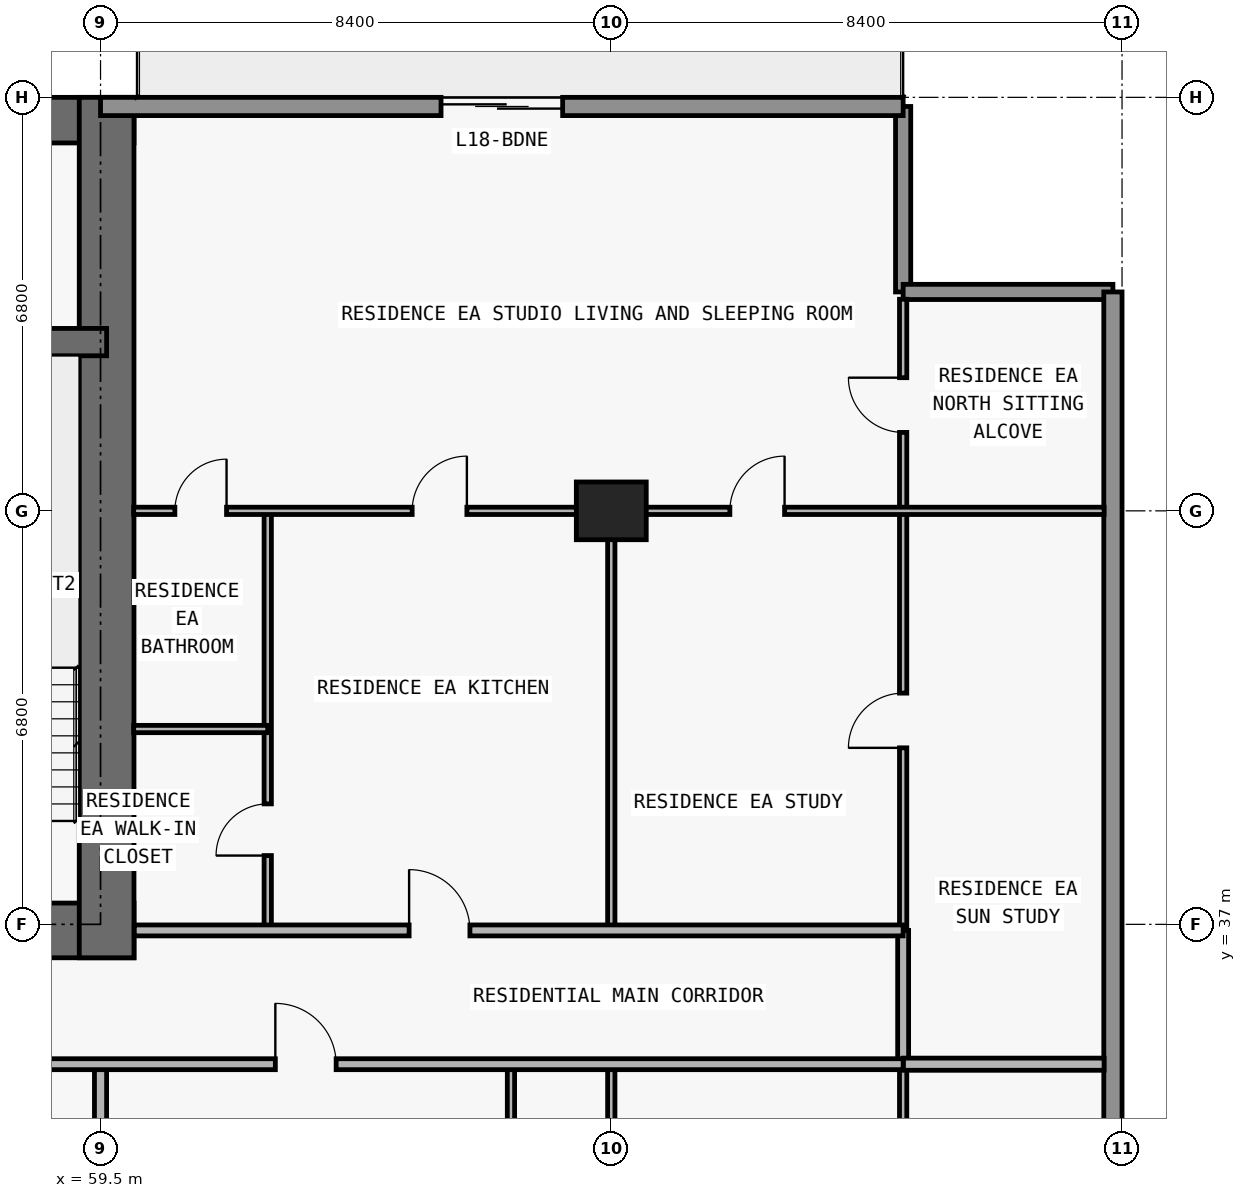
"""IFC4 building model, lengths in metres.
Left out: names, types, materials, properties, quantities, classifications, styles, units other than length and angle.
Written with IfcOpenShell. Run it as: python <this file> out.ifc"""

import sys

from ifc_helpers import new_model, si_unit, direction, frame, frame_2d, origin, origin_2d, place, context, subcontext, project, spatial, rectangle, extrude, element, fill, save


model = new_model("IFC4")
c1 = context("Model", 3, precision=1e-05, world=origin(), true_north=direction((0.0, 1.0)))
c2 = subcontext(c1, "Body", "Model", "MODEL_VIEW")
j1 = project(units=[si_unit("LENGTHUNIT", "METRE"), si_unit("PLANEANGLEUNIT", "RADIAN")], contexts=[c1])
p1 = place(None, origin())
s1 = spatial("IfcSite", under=j1, at=p1, CompositionType="ELEMENT")
p2 = place(p1, origin())
s2 = spatial("IfcBuilding", under=s1, at=p2, CompositionType="ELEMENT")
p3 = place(p2, frame((0.0, 0.0, 69.6)))
s3 = spatial("IfcBuildingStorey", under=s2, at=p3, CompositionType="ELEMENT", Elevation=69.6)
p4 = place(p3, frame((67.9, 43.8, 0.0), z_axis=(0.0, 0.0, 1.0), x_axis=(1.0, 0.0, 0.0)))
e1 = element("IfcColumn", 1, at=p4, inside=s3, PredefinedType="COLUMN", context=c2, shape_type="SweptSolid", body=[
    extrude(rectangle(XDim=1.15, YDim=0.95, at=origin_2d()), origin(), (0.0, 0.0, 1.0), 3.05),
])
p5 = place(p3, frame((17.75, 36.9, 0.0), z_axis=(0.0, 0.0, 1.0), x_axis=(1.0, 0.0, 0.0)))
e2 = element("IfcWall", 2, at=p5, inside=s3, PredefinedType="SHEAR", context=c2, shape_type="SweptSolid", body=[
    extrude(rectangle(XDim=42.3, YDim=0.9, at=frame_2d((21.15, 0.0))), origin(), (0.0, 0.0, 1.0), 3.05),
])
p6 = place(p5, frame((14.55, 0.0, 0.0)))
e3 = element("IfcOpeningElement", 3, at=p6, cuts=e2, PredefinedType="OPENING", context=c2, shape_type="SweptSolid", body=[
    extrude(rectangle(XDim=1.1, YDim=2.15, at=frame_2d((0.55, 1.075))), frame((0.0, 0.46, 0.0), z_axis=(0.0, -1.0, 0.0), x_axis=(1.0, 0.0, 0.0)), (0.0, 0.0, 1.0), 0.92),
])
p7 = place(p5, frame((6.4, 0.0, 0.0)))
e4 = element("IfcOpeningElement", 4, at=p7, cuts=e2, PredefinedType="OPENING", context=c2, shape_type="SweptSolid", body=[
    extrude(rectangle(XDim=1.05, YDim=2.15, at=frame_2d((0.525, 1.075))), frame((0.0, 0.46, 0.0), z_axis=(0.0, -1.0, 0.0), x_axis=(1.0, 0.0, 0.0)), (0.0, 0.0, 1.0), 0.92),
])
p8 = place(p5, frame((34.9, 0.0, 0.0)))
e5 = element("IfcOpeningElement", 5, at=p8, cuts=e2, PredefinedType="OPENING", context=c2, shape_type="SweptSolid", body=[
    extrude(rectangle(XDim=1.05, YDim=2.15, at=frame_2d((0.525, 1.075))), frame((0.0, 0.46, 0.0), z_axis=(0.0, -1.0, 0.0), x_axis=(1.0, 0.0, 0.0)), (0.0, 0.0, 1.0), 0.92),
])
p9 = place(p5, frame((11.012, 0.0, 0.0)))
e6 = element("IfcOpeningElement", 6, at=p9, cuts=e2, PredefinedType="OPENING", context=c2, shape_type="SweptSolid", body=[
    extrude(rectangle(XDim=1.05, YDim=2.15, at=frame_2d((0.525, 1.075))), frame((0.0, 0.46, 0.0), z_axis=(0.0, -1.0, 0.0), x_axis=(1.0, 0.0, 0.0)), (0.0, 0.0, 1.0), 0.92),
])
p10 = place(p5, frame((24.25, 0.0, 0.0)))
e7 = element("IfcOpeningElement", 7, at=p10, cuts=e2, PredefinedType="OPENING", context=c2, shape_type="SweptSolid", body=[
    extrude(rectangle(XDim=1.05, YDim=2.15, at=frame_2d((0.525, 1.075))), frame((0.0, 0.46, 0.0), z_axis=(0.0, -1.0, 0.0), x_axis=(1.0, 0.0, 0.0)), (0.0, 0.0, 1.0), 0.92),
])
p11 = place(p3, frame((17.75, 50.225, 0.0), z_axis=(0.0, 0.0, 1.0), x_axis=(1.0, 0.0, 0.0)))
e8 = element("IfcWall", 8, at=p11, inside=s3, PredefinedType="SHEAR", context=c2, shape_type="SweptSolid", body=[
    extrude(rectangle(XDim=42.3, YDim=0.75, at=frame_2d((21.15, 0.0))), origin(), (0.0, 0.0, 1.0), 3.05),
])
p12 = place(p3, frame((59.6, 36.45, 0.0), z_axis=(0.0, 0.0, 1.0), x_axis=(0.0, 1.0, 0.0)))
e9 = element("IfcWall", 9, at=p12, inside=s3, PredefinedType="SHEAR", context=c2, shape_type="SweptSolid", body=[
    extrude(rectangle(XDim=14.15, YDim=0.9, at=frame_2d((7.075, 0.0))), origin(), (0.0, 0.0, 1.0), 3.05),
])
p13 = place(p3, frame((18.2, 46.575, 0.0), z_axis=(0.0, 0.0, 1.0), x_axis=(1.0, 0.0, 0.0)))
e10 = element("IfcWall", 10, at=p13, inside=s3, PredefinedType="SHEAR", context=c2, shape_type="SweptSolid", body=[
    extrude(rectangle(XDim=41.4, YDim=0.45, at=frame_2d((20.7, 0.0))), origin(), (0.0, 0.0, 1.0), 3.05),
])
p14 = place(p13, frame((7.675, 0.0, 0.0)))
e11 = element("IfcOpeningElement", 11, at=p14, cuts=e10, PredefinedType="OPENING", context=c2, shape_type="SweptSolid", body=[
    extrude(rectangle(XDim=1.05, YDim=2.15, at=frame_2d((0.525, 1.075))), frame((0.0, 0.235, 0.0), z_axis=(0.0, -1.0, 0.0), x_axis=(1.0, 0.0, 0.0)), (0.0, 0.0, 1.0), 0.47),
])
p15 = place(p13, frame((32.725, 0.0, 0.0)))
e12 = element("IfcOpeningElement", 12, at=p15, cuts=e10, PredefinedType="OPENING", context=c2, shape_type="SweptSolid", body=[
    extrude(rectangle(XDim=1.05, YDim=2.15, at=frame_2d((0.525, 1.075))), frame((0.0, 0.235, 0.0), z_axis=(0.0, -1.0, 0.0), x_axis=(1.0, 0.0, 0.0)), (0.0, 0.0, 1.0), 0.47),
])
p16 = place(p3, frame((72.7, 50.45, 0.0), z_axis=(0.0, 0.0, 1.0), x_axis=(0.0, -1.0, 0.0)))
e13 = element("IfcWall", 13, at=p16, inside=s3, PredefinedType="ELEMENTEDWALL", context=c2, shape_type="SweptSolid", body=[
    extrude(rectangle(XDim=3.05, YDim=0.25, at=frame_2d((1.525, 0.0))), origin(), (0.0, 0.0, 1.0), 3.05),
])
p17 = place(p3, frame((72.7, 47.4, 0.0), z_axis=(0.0, 0.0, 1.0), x_axis=(1.0, 0.0, 0.0)))
e14 = element("IfcWall", 14, at=p17, inside=s3, PredefinedType="ELEMENTEDWALL", context=c2, shape_type="SweptSolid", body=[
    extrude(rectangle(XDim=3.45, YDim=0.25, at=frame_2d((1.725, 0.0))), origin(), (0.0, 0.0, 1.0), 3.05),
])
p18 = place(p3, frame((76.15, 47.4, 0.0), z_axis=(0.0, 0.0, 1.0), x_axis=(0.0, -1.0, 0.0)))
e15 = element("IfcWall", 15, at=p18, inside=s3, PredefinedType="STANDARD", context=c2, shape_type="SweptSolid", body=[
    extrude(rectangle(XDim=20.6, YDim=0.3, at=frame_2d((10.3, 0.0))), origin(), (0.0, 0.0, 1.0), 3.05),
])
p19 = place(p3, frame((59.5, 50.45, 0.0), z_axis=(0.0, 0.0, 1.0), x_axis=(1.0, 0.0, 0.0)))
e16 = element("IfcWall", 16, at=p19, inside=s3, PredefinedType="STANDARD", context=c2, shape_type="SweptSolid", body=[
    extrude(rectangle(XDim=13.2, YDim=0.3, at=frame_2d((6.6, 0.0))), origin(), (0.0, 0.0, 1.0), 3.05),
])
p20 = place(p19, frame((5.6, 0.0, 0.0)))
e17 = element("IfcOpeningElement", 17, at=p20, cuts=e16, PredefinedType="OPENING", context=c2, shape_type="SweptSolid", body=[
    extrude(rectangle(XDim=2.0, YDim=2.3, at=frame_2d((1.0, 1.15))), frame((0.0, 0.16, 0.0), z_axis=(0.0, -1.0, 0.0), x_axis=(1.0, 0.0, 0.0)), (0.0, 0.0, 1.0), 0.32),
])
p21 = place(p3, frame((59.5, 26.44, 0.0), z_axis=(0.0, 0.0, 1.0), x_axis=(0.0, 1.0, 0.0)))
e18 = element("IfcWall", 18, at=p21, inside=s3, PredefinedType="PARTITIONING", context=c2, shape_type="SweptSolid", body=[
    extrude(rectangle(XDim=8.26, YDim=0.2, at=frame_2d((4.13, 0.0))), origin(), (0.0, 0.0, 1.0), 2.11),
])
p22 = place(p3, frame((62.25, 36.9, 0.0), z_axis=(0.0, 0.0, 1.0), x_axis=(0.0, 1.0, 0.0)))
e19 = element("IfcWall", 19, at=p22, inside=s3, PredefinedType="PARTITIONING", context=c2, shape_type="SweptSolid", body=[
    extrude(rectangle(XDim=6.9, YDim=0.12, at=frame_2d((3.45, 0.0))), origin(), (0.0, 0.0, 1.0), 3.05),
])
p23 = place(p22, frame((1.231, 0.0, 0.0)))
e20 = element("IfcOpeningElement", 20, at=p23, cuts=e19, PredefinedType="OPENING", context=c2, shape_type="SweptSolid", body=[
    extrude(rectangle(XDim=0.85, YDim=2.1, at=frame_2d((0.425, 1.05))), frame((0.0, 0.07, 0.0), z_axis=(0.0, -1.0, 0.0), x_axis=(1.0, 0.0, 0.0)), (0.0, 0.0, 1.0), 0.14),
])
p24 = place(p3, frame((66.25, 26.44, 0.0), z_axis=(0.0, 0.0, 1.0), x_axis=(0.0, 1.0, 0.0)))
e21 = element("IfcWall", 21, at=p24, inside=s3, PredefinedType="PARTITIONING", context=c2, shape_type="SweptSolid", body=[
    extrude(rectangle(XDim=8.26, YDim=0.12, at=frame_2d((4.13, 0.0))), origin(), (0.0, 0.0, 1.0), 3.05),
])
p25 = place(p24, frame((4.005, 0.0, 0.0)))
e22 = element("IfcOpeningElement", 22, at=p25, cuts=e21, PredefinedType="OPENING", context=c2, shape_type="SweptSolid", body=[
    extrude(rectangle(XDim=0.85, YDim=2.1, at=frame_2d((0.425, 1.05))), frame((0.0, 0.07, 0.0), z_axis=(0.0, -1.0, 0.0), x_axis=(1.0, 0.0, 0.0)), (0.0, 0.0, 1.0), 0.14),
])
p26 = place(p3, frame((67.9, 26.44, 0.0), z_axis=(0.0, 0.0, 1.0), x_axis=(0.0, 1.0, 0.0)))
e23 = element("IfcWall", 23, at=p26, inside=s3, PredefinedType="PARTITIONING", context=c2, shape_type="SweptSolid", body=[
    extrude(rectangle(XDim=8.26, YDim=0.12, at=frame_2d((4.13, 0.0))), origin(), (0.0, 0.0, 1.0), 2.11),
])
p27 = place(p3, frame((67.9, 36.9, 0.0), z_axis=(0.0, 0.0, 1.0), x_axis=(0.0, 1.0, 0.0)))
e24 = element("IfcWall", 24, at=p27, inside=s3, PredefinedType="PARTITIONING", context=c2, shape_type="SweptSolid", body=[
    extrude(rectangle(XDim=6.9, YDim=0.12, at=frame_2d((3.45, 0.0))), origin(), (0.0, 0.0, 1.0), 2.11),
])
p28 = place(p3, frame((72.7, 26.44, 0.0), z_axis=(0.0, 0.0, 1.0), x_axis=(0.0, 1.0, 0.0)))
e25 = element("IfcWall", 25, at=p28, inside=s3, PredefinedType="PARTITIONING", context=c2, shape_type="SweptSolid", body=[
    extrude(rectangle(XDim=8.26, YDim=0.12, at=frame_2d((4.13, 0.0))), origin(), (0.0, 0.0, 1.0), 3.05),
])
p29 = place(p3, frame((72.7, 34.705, 0.0), z_axis=(0.0, 0.0, 1.0), x_axis=(0.0, 1.0, 0.0)))
e26 = element("IfcWall", 26, at=p29, inside=s3, PredefinedType="PARTITIONING", context=c2, shape_type="SweptSolid", body=[
    extrude(rectangle(XDim=2.195, YDim=0.18, at=frame_2d((1.097, 0.0))), origin(), (0.0, 0.0, 1.0), 3.05),
])
p30 = place(p3, frame((72.7, 36.905, 0.0), z_axis=(0.0, 0.0, 1.0), x_axis=(0.0, 1.0, 0.0)))
e27 = element("IfcWall", 27, at=p30, inside=s3, PredefinedType="PARTITIONING", context=c2, shape_type="SweptSolid", body=[
    extrude(rectangle(XDim=10.375, YDim=0.12, at=frame_2d((5.188, 0.0))), origin(), (0.0, 0.0, 1.0), 3.05),
])
p31 = place(p30, frame((2.998, 0.0, 0.0)))
e28 = element("IfcOpeningElement", 28, at=p31, cuts=e27, PredefinedType="OPENING", context=c2, shape_type="SweptSolid", body=[
    extrude(rectangle(XDim=0.9, YDim=2.15, at=frame_2d((0.45, 1.075))), frame((0.0, 0.07, 0.0), z_axis=(0.0, -1.0, 0.0), x_axis=(1.0, 0.0, 0.0)), (0.0, 0.0, 1.0), 0.14),
])
p32 = place(p30, frame((8.185, 0.0, 0.0)))
e29 = element("IfcOpeningElement", 29, at=p32, cuts=e27, PredefinedType="OPENING", context=c2, shape_type="SweptSolid", body=[
    extrude(rectangle(XDim=0.9, YDim=2.15, at=frame_2d((0.45, 1.075))), frame((0.0, 0.07, 0.0), z_axis=(0.0, -1.0, 0.0), x_axis=(1.0, 0.0, 0.0)), (0.0, 0.0, 1.0), 0.14),
])
p33 = place(p3, frame((5.105, 34.7, 0.0), z_axis=(0.0, 0.0, 1.0), x_axis=(1.0, 0.0, 0.0)))
e30 = element("IfcWall", 30, at=p33, inside=s3, PredefinedType="PARTITIONING", context=c2, shape_type="SweptSolid", body=[
    extrude(rectangle(XDim=67.595, YDim=0.18, at=frame_2d((33.797, 0.0))), origin(), (0.0, 0.0, 1.0), 3.05),
])
p34 = place(p33, frame((7.67, 0.0, 0.0)))
e31 = element("IfcOpeningElement", 31, at=p34, cuts=e30, PredefinedType="OPENING", context=c2, shape_type="SweptSolid", body=[
    extrude(rectangle(XDim=1.0, YDim=2.2, at=frame_2d((0.5, 1.1))), frame((0.0, 0.1, 0.0), z_axis=(0.0, -1.0, 0.0), x_axis=(1.0, 0.0, 0.0)), (0.0, 0.0, 1.0), 0.2),
])
p35 = place(p33, frame((16.07, 0.0, 0.0)))
e32 = element("IfcOpeningElement", 32, at=p35, cuts=e30, PredefinedType="OPENING", context=c2, shape_type="SweptSolid", body=[
    extrude(rectangle(XDim=1.0, YDim=2.2, at=frame_2d((0.5, 1.1))), frame((0.0, 0.1, 0.0), z_axis=(0.0, -1.0, 0.0), x_axis=(1.0, 0.0, 0.0)), (0.0, 0.0, 1.0), 0.2),
])
p36 = place(p33, frame((24.47, 0.0, 0.0)))
e33 = element("IfcOpeningElement", 33, at=p36, cuts=e30, PredefinedType="OPENING", context=c2, shape_type="SweptSolid", body=[
    extrude(rectangle(XDim=1.0, YDim=2.2, at=frame_2d((0.5, 1.1))), frame((0.0, 0.1, 0.0), z_axis=(0.0, -1.0, 0.0), x_axis=(1.0, 0.0, 0.0)), (0.0, 0.0, 1.0), 0.2),
])
p37 = place(p33, frame((32.47, 0.0, 0.0)))
e34 = element("IfcOpeningElement", 34, at=p37, cuts=e30, PredefinedType="OPENING", context=c2, shape_type="SweptSolid", body=[
    extrude(rectangle(XDim=1.0, YDim=2.2, at=frame_2d((0.5, 1.1))), frame((0.0, 0.1, 0.0), z_axis=(0.0, -1.0, 0.0), x_axis=(1.0, 0.0, 0.0)), (0.0, 0.0, 1.0), 0.2),
])
p38 = place(p33, frame((40.47, 0.0, 0.0)))
e35 = element("IfcOpeningElement", 35, at=p38, cuts=e30, PredefinedType="OPENING", context=c2, shape_type="SweptSolid", body=[
    extrude(rectangle(XDim=1.0, YDim=2.2, at=frame_2d((0.5, 1.1))), frame((0.0, 0.1, 0.0), z_axis=(0.0, -1.0, 0.0), x_axis=(1.0, 0.0, 0.0)), (0.0, 0.0, 1.0), 0.2),
])
p39 = place(p33, frame((48.87, 0.0, 0.0)))
e36 = element("IfcOpeningElement", 36, at=p39, cuts=e30, PredefinedType="OPENING", context=c2, shape_type="SweptSolid", body=[
    extrude(rectangle(XDim=1.0, YDim=2.2, at=frame_2d((0.5, 1.1))), frame((0.0, 0.1, 0.0), z_axis=(0.0, -1.0, 0.0), x_axis=(1.0, 0.0, 0.0)), (0.0, 0.0, 1.0), 0.2),
])
p40 = place(p33, frame((57.27, 0.0, 0.0)))
e37 = element("IfcOpeningElement", 37, at=p40, cuts=e30, PredefinedType="OPENING", context=c2, shape_type="SweptSolid", body=[
    extrude(rectangle(XDim=1.0, YDim=2.2, at=frame_2d((0.5, 1.1))), frame((0.0, 0.1, 0.0), z_axis=(0.0, -1.0, 0.0), x_axis=(1.0, 0.0, 0.0)), (0.0, 0.0, 1.0), 0.2),
])
p41 = place(p3, frame((72.705, 34.7, 0.0), z_axis=(0.0, 0.0, 1.0), x_axis=(1.0, 0.0, 0.0)))
e38 = element("IfcWall", 38, at=p41, inside=s3, PredefinedType="PARTITIONING", context=c2, shape_type="SweptSolid", body=[
    extrude(rectangle(XDim=3.3, YDim=0.2, at=frame_2d((1.65, 0.0))), origin(), (0.0, 0.0, 1.0), 3.05),
])
p42 = place(p3, frame((60.055, 36.9, 0.0), z_axis=(0.0, 0.0, 1.0), x_axis=(1.0, 0.0, 0.0)))
e39 = element("IfcWall", 39, at=p42, inside=s3, PredefinedType="PARTITIONING", context=c2, shape_type="SweptSolid", body=[
    extrude(rectangle(XDim=12.645, YDim=0.18, at=frame_2d((6.323, 0.0))), origin(), (0.0, 0.0, 1.0), 3.05),
])
p43 = place(p42, frame((4.52, 0.0, 0.0)))
e40 = element("IfcOpeningElement", 40, at=p43, cuts=e39, PredefinedType="OPENING", context=c2, shape_type="SweptSolid", body=[
    extrude(rectangle(XDim=1.0, YDim=2.2, at=frame_2d((0.5, 1.1))), frame((0.0, 0.1, 0.0), z_axis=(0.0, -1.0, 0.0), x_axis=(1.0, 0.0, 0.0)), (0.0, 0.0, 1.0), 0.2),
])
p44 = place(p3, frame((60.045, 40.212, 0.0), z_axis=(0.0, 0.0, 1.0), x_axis=(1.0, 0.0, 0.0)))
e41 = element("IfcWall", 41, at=p44, inside=s3, PredefinedType="PARTITIONING", context=c2, shape_type="SweptSolid", body=[
    extrude(rectangle(XDim=2.205, YDim=0.12, at=frame_2d((1.103, 0.0))), origin(), (0.0, 0.0, 1.0), 3.05),
])
p45 = place(p3, frame((60.045, 43.8, 0.0), z_axis=(0.0, 0.0, 1.0), x_axis=(1.0, 0.0, 0.0)))
e42 = element("IfcWall", 42, at=p45, inside=s3, PredefinedType="PARTITIONING", context=c2, shape_type="SweptSolid", body=[
    extrude(rectangle(XDim=15.96, YDim=0.12, at=frame_2d((7.98, 0.0))), origin(), (0.0, 0.0, 1.0), 2.339),
])
p46 = place(p45, frame((9.805, 0.0, 0.0)))
e43 = element("IfcOpeningElement", 43, at=p46, cuts=e42, PredefinedType="OPENING", context=c2, shape_type="SweptSolid", body=[
    extrude(rectangle(XDim=0.9, YDim=2.15, at=frame_2d((0.45, 1.075))), frame((0.0, 0.07, 0.0), z_axis=(0.0, -1.0, 0.0), x_axis=(1.0, 0.0, 0.0)), (0.0, 0.0, 1.0), 0.14),
])
p47 = place(p45, frame((4.58, 0.0, 0.0)))
e44 = element("IfcOpeningElement", 44, at=p47, cuts=e42, PredefinedType="OPENING", context=c2, shape_type="SweptSolid", body=[
    extrude(rectangle(XDim=0.9, YDim=2.15, at=frame_2d((0.45, 1.075))), frame((0.0, 0.07, 0.0), z_axis=(0.0, -1.0, 0.0), x_axis=(1.0, 0.0, 0.0)), (0.0, 0.0, 1.0), 0.14),
])
p48 = place(p45, frame((0.677, 0.0, 0.0)))
e45 = element("IfcOpeningElement", 45, at=p48, cuts=e42, PredefinedType="OPENING", context=c2, shape_type="SweptSolid", body=[
    extrude(rectangle(XDim=0.85, YDim=2.1, at=frame_2d((0.425, 1.05))), frame((0.0, 0.07, 0.0), z_axis=(0.0, -1.0, 0.0), x_axis=(1.0, 0.0, 0.0)), (0.0, 0.0, 1.0), 0.14),
])
p49 = place(p20, origin())
e46 = element("IfcDoor", 46, at=p49, inside=s3, OperationType="DOUBLE_DOOR_SLIDING", PredefinedType="DOOR", context=c2, shape_type="SweptSolid", body=[
    extrude(rectangle(XDim=2.0, YDim=2.3, at=frame_2d((1.0, 1.15))), frame((0.0, 0.025, 0.0), z_axis=(0.0, -1.0, 0.0), x_axis=(1.0, 0.0, 0.0)), (0.0, 0.0, 1.0), 0.05),
])
fill(e17, e46)
p50 = place(p40, origin())
e47 = element("IfcDoor", 47, at=p50, inside=s3, OperationType="SINGLE_SWING_LEFT", PredefinedType="DOOR", context=c2, shape_type="SweptSolid", body=[
    extrude(rectangle(XDim=1.0, YDim=2.2, at=frame_2d((0.5, 1.1))), frame((0.0, 0.025, 0.0), z_axis=(0.0, -1.0, 0.0), x_axis=(1.0, 0.0, 0.0)), (0.0, 0.0, 1.0), 0.05),
])
fill(e37, e47)
p51 = place(p46, origin())
e48 = element("IfcDoor", 48, at=p51, inside=s3, OperationType="SINGLE_SWING_RIGHT", PredefinedType="DOOR", context=c2, shape_type="SweptSolid", body=[
    extrude(rectangle(XDim=0.9, YDim=2.15, at=frame_2d((0.45, 1.075))), frame((0.0, 0.025, 0.0), z_axis=(0.0, -1.0, 0.0), x_axis=(1.0, 0.0, 0.0)), (0.0, 0.0, 1.0), 0.05),
])
fill(e43, e48)
p52 = place(p43, origin())
e49 = element("IfcDoor", 49, at=p52, inside=s3, OperationType="SINGLE_SWING_LEFT", PredefinedType="DOOR", context=c2, shape_type="SweptSolid", body=[
    extrude(rectangle(XDim=1.0, YDim=2.2, at=frame_2d((0.5, 1.1))), frame((0.0, 0.025, 0.0), z_axis=(0.0, -1.0, 0.0), x_axis=(1.0, 0.0, 0.0)), (0.0, 0.0, 1.0), 0.05),
])
fill(e40, e49)
p53 = place(p47, origin())
e50 = element("IfcDoor", 50, at=p53, inside=s3, OperationType="SINGLE_SWING_RIGHT", PredefinedType="DOOR", context=c2, shape_type="SweptSolid", body=[
    extrude(rectangle(XDim=0.9, YDim=2.15, at=frame_2d((0.45, 1.075))), frame((0.0, 0.025, 0.0), z_axis=(0.0, -1.0, 0.0), x_axis=(1.0, 0.0, 0.0)), (0.0, 0.0, 1.0), 0.05),
])
fill(e44, e50)
p54 = place(p23, origin())
e51 = element("IfcDoor", 51, at=p54, inside=s3, OperationType="SINGLE_SWING_LEFT", PredefinedType="DOOR", context=c2, shape_type="SweptSolid", body=[
    extrude(rectangle(XDim=0.85, YDim=2.1, at=frame_2d((0.425, 1.05))), frame((0.0, 0.025, 0.0), z_axis=(0.0, -1.0, 0.0), x_axis=(1.0, 0.0, 0.0)), (0.0, 0.0, 1.0), 0.05),
])
fill(e20, e51)
p55 = place(p48, origin())
e52 = element("IfcDoor", 52, at=p55, inside=s3, OperationType="SINGLE_SWING_RIGHT", PredefinedType="DOOR", context=c2, shape_type="SweptSolid", body=[
    extrude(rectangle(XDim=0.85, YDim=2.1, at=frame_2d((0.425, 1.05))), frame((0.0, 0.025, 0.0), z_axis=(0.0, -1.0, 0.0), x_axis=(1.0, 0.0, 0.0)), (0.0, 0.0, 1.0), 0.05),
])
fill(e45, e52)
p56 = place(p31, origin())
e53 = element("IfcDoor", 53, at=p56, inside=s3, OperationType="SINGLE_SWING_LEFT", PredefinedType="DOOR", context=c2, shape_type="SweptSolid", body=[
    extrude(rectangle(XDim=0.9, YDim=2.15, at=frame_2d((0.45, 1.075))), frame((0.0, 0.025, 0.0), z_axis=(0.0, -1.0, 0.0), x_axis=(1.0, 0.0, 0.0)), (0.0, 0.0, 1.0), 0.05),
])
fill(e28, e53)
p57 = place(p32, origin())
e54 = element("IfcDoor", 54, at=p57, inside=s3, OperationType="SINGLE_SWING_RIGHT", PredefinedType="DOOR", context=c2, shape_type="SweptSolid", body=[
    extrude(rectangle(XDim=0.9, YDim=2.15, at=frame_2d((0.45, 1.075))), frame((0.0, 0.025, 0.0), z_axis=(0.0, -1.0, 0.0), x_axis=(1.0, 0.0, 0.0)), (0.0, 0.0, 1.0), 0.05),
])
fill(e29, e54)
save(model, sys.argv[1])
